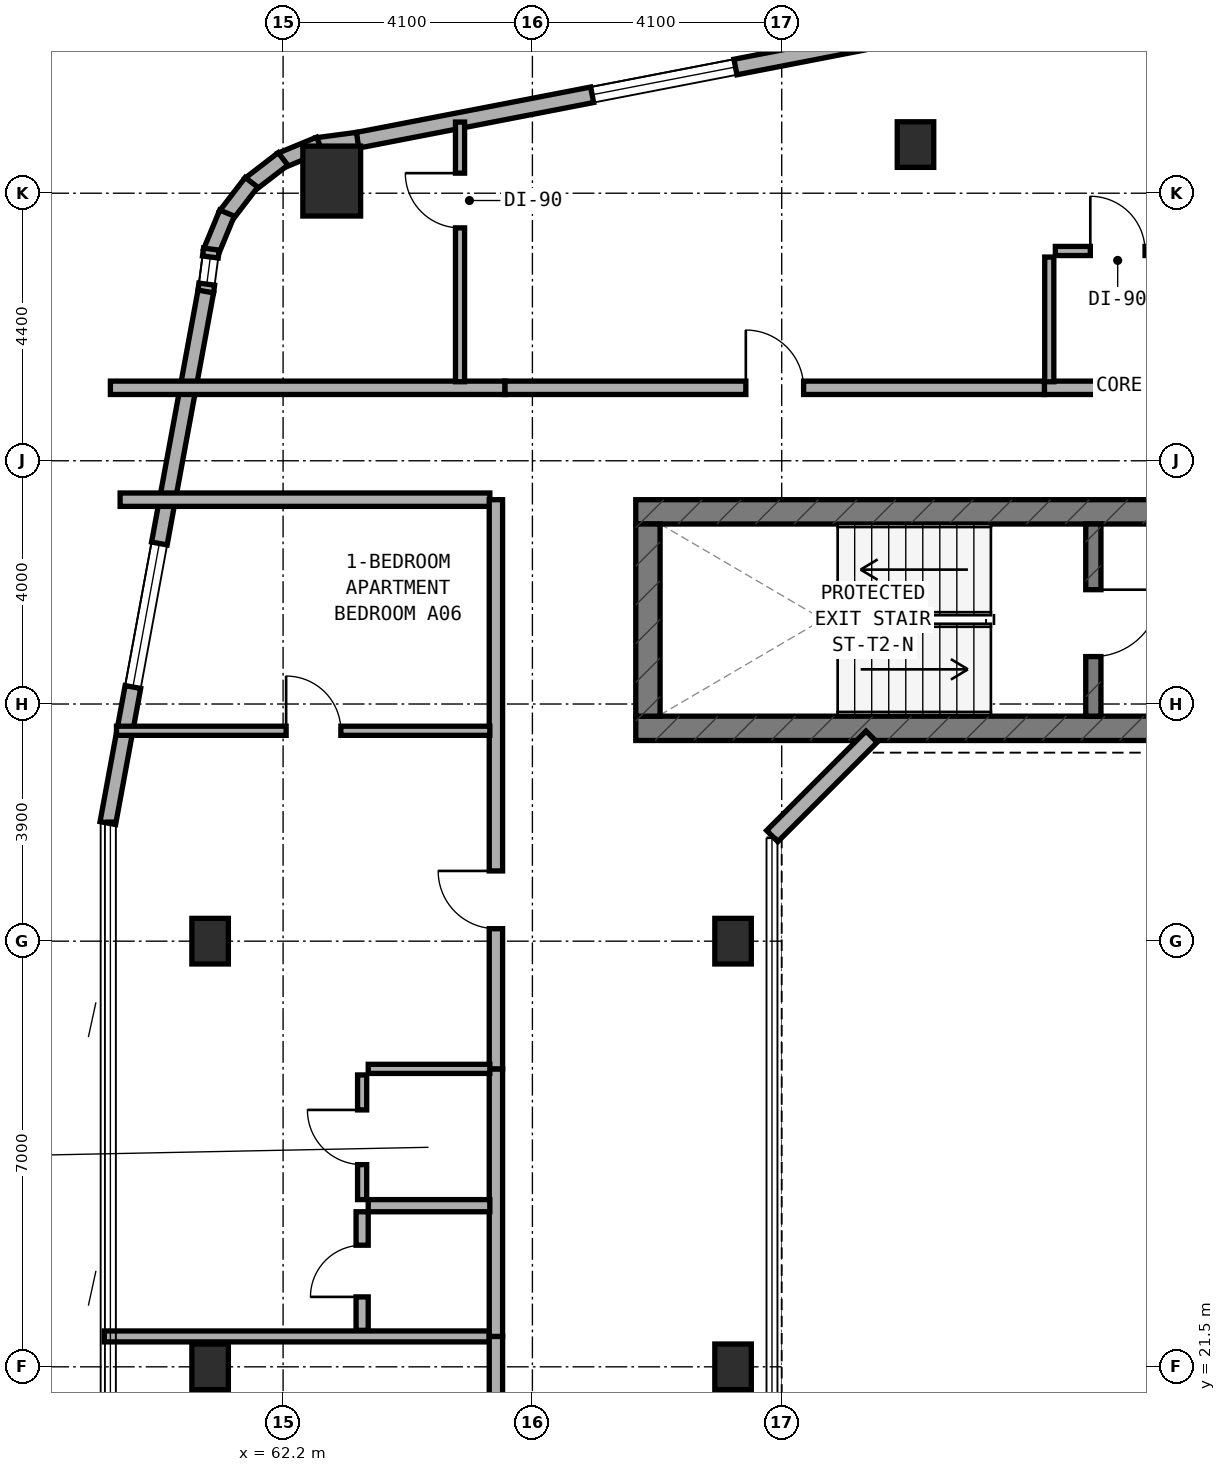
"""IFC4 building model, lengths in metres.
Left out: names, types, materials, properties, quantities, classifications, styles, units other than length and angle.
Written with IfcOpenShell. Run it as: python <this file> out.ifc"""

import sys

from ifc_helpers import new_model, si_unit, direction, frame, frame_2d, origin, origin_2d, place, context, subcontext, project, spatial, rectangle, extrude, element, fill, save


model = new_model("IFC4")
c1 = context("Model", 3, precision=1e-05, world=origin(), true_north=direction((0.0, 1.0)))
c2 = subcontext(c1, "Body", "Model", "MODEL_VIEW")
j1 = project(units=[si_unit("LENGTHUNIT", "METRE"), si_unit("PLANEANGLEUNIT", "RADIAN")], contexts=[c1])
p1 = place(None, origin())
s1 = spatial("IfcSite", under=j1, at=p1, CompositionType="ELEMENT")
p2 = place(p1, origin())
s2 = spatial("IfcBuilding", under=s1, at=p2, CompositionType="ELEMENT")
p3 = place(p2, frame((0.0, 0.0, 95.0)))
s3 = spatial("IfcBuildingStorey", under=s2, at=p3, CompositionType="ELEMENT", Elevation=95.0)
p4 = place(p3, frame((68.0, 32.0, 0.0), z_axis=(0.0, 0.0, 1.0), x_axis=(1.0, 0.0, 0.0)))
e1 = element("IfcWall", 1, at=p4, inside=s3, PredefinedType="SHEAR", context=c2, shape_type="SweptSolid", body=[
    extrude(rectangle(XDim=18.2, YDim=0.4, at=frame_2d((9.1, 0.0))), origin(), (0.0, 0.0, 1.0), 3.5),
])
p5 = place(p3, frame((68.0, 35.56, 0.0), z_axis=(0.0, 0.0, 1.0), x_axis=(1.0, 0.0, 0.0)))
e2 = element("IfcWall", 2, at=p5, inside=s3, PredefinedType="SHEAR", context=c2, shape_type="SweptSolid", body=[
    extrude(rectangle(XDim=18.2, YDim=0.4, at=frame_2d((9.1, 0.0))), origin(), (0.0, 0.0, 1.0), 3.5),
])
p6 = place(p5, frame((9.15, 0.0, 0.0)))
e3 = element("IfcOpeningElement", 3, at=p6, cuts=e2, PredefinedType="OPENING", context=c2, shape_type="SweptSolid", body=[
    extrude(rectangle(XDim=1.2, YDim=2.15, at=frame_2d((0.6, 1.075))), frame((0.0, 0.21, 0.0), z_axis=(0.0, -1.0, 0.0), x_axis=(1.0, 0.0, 0.0)), (0.0, 0.0, 1.0), 0.42),
])
p7 = place(p5, frame((16.75, 0.0, 0.0)))
e4 = element("IfcOpeningElement", 4, at=p7, cuts=e2, PredefinedType="OPENING", context=c2, shape_type="SweptSolid", body=[
    extrude(rectangle(XDim=0.85, YDim=2.1, at=frame_2d((0.425, 1.05))), frame((0.0, 0.21, 0.0), z_axis=(0.0, -1.0, 0.0), x_axis=(1.0, 0.0, 0.0)), (0.0, 0.0, 1.0), 0.42),
])
p8 = place(p3, frame((68.2, 32.2, 0.0), z_axis=(0.0, 0.0, 1.0), x_axis=(0.0, 1.0, 0.0)))
e5 = element("IfcWall", 5, at=p8, inside=s3, PredefinedType="SHEAR", context=c2, shape_type="SweptSolid", body=[
    extrude(rectangle(XDim=3.16, YDim=0.4, at=frame_2d((1.58, 0.0))), origin(), (0.0, 0.0, 1.0), 3.5),
])
p9 = place(p3, frame((75.525, 32.2, 0.0), z_axis=(0.0, 0.0, 1.0), x_axis=(0.0, 1.0, 0.0)))
e6 = element("IfcWall", 6, at=p9, inside=s3, PredefinedType="STANDARD", context=c2, shape_type="SweptSolid", body=[
    extrude(rectangle(XDim=3.16, YDim=0.25, at=frame_2d((1.58, 0.0))), origin(), (0.0, 0.0, 1.0), 3.25),
])
p10 = place(p9, frame((0.98, 0.0, 0.0)))
e7 = element("IfcOpeningElement", 7, at=p10, cuts=e6, PredefinedType="OPENING", context=c2, shape_type="SweptSolid", body=[
    extrude(rectangle(XDim=1.1, YDim=2.15, at=frame_2d((0.55, 1.075))), frame((0.0, 0.135, 0.0), z_axis=(0.0, -1.0, 0.0), x_axis=(1.0, 0.0, 0.0)), (0.0, 0.0, 1.0), 0.27),
])
for number, where, z_axis, x_axis in (
    (8, (72.6, 41.6, 0.0), (0.0, 0.0, 1.0), (1.0, 0.0, 0.0)),
    (9, (61.0, 21.5, 0.0), (0.0, 0.0, 1.0), (1.0, 0.0, 0.0)),
    (10, (61.0, 28.5, 0.0), (0.0, 0.0, 1.0), (1.0, 0.0, 0.0)),
):
    element("IfcColumn", number, at=place(p3, frame(where, z_axis=z_axis, x_axis=x_axis)), inside=s3, PredefinedType="COLUMN", context=c2, shape_type="SweptSolid", body=[
        extrude(rectangle(XDim=0.6, YDim=0.75, at=origin_2d()), origin(), (0.0, 0.0, 1.0), 3.5),
    ])
p11 = place(p3, frame((63.0, 41.0, 0.0), z_axis=(0.0, 0.0, 1.0), x_axis=(1.0, 0.0, 0.0)))
e11 = element("IfcColumn", 11, at=p11, inside=s3, PredefinedType="COLUMN", context=c2, shape_type="SweptSolid", body=[
    extrude(rectangle(XDim=0.95, YDim=1.15, at=origin_2d()), origin(), (0.0, 0.0, 1.0), 3.5),
])
for number, where, z_axis, x_axis in (
    (12, (69.6, 21.5, 0.0), (0.0, 0.0, 1.0), (1.0, 0.0, 0.0)),
    (13, (69.6, 28.5, 0.0), (0.0, 0.0, 1.0), (1.0, 0.0, 0.0)),
):
    element("IfcColumn", number, at=place(p3, frame(where, z_axis=z_axis, x_axis=x_axis)), inside=s3, PredefinedType="COLUMN", context=c2, shape_type="SweptSolid", body=[
        extrude(rectangle(XDim=0.6, YDim=0.75, at=origin_2d()), origin(), (0.0, 0.0, 1.0), 3.5),
    ])
p12 = place(p3, frame((71.739, 43.282, 0.0), z_axis=(0.0, 0.0, 1.0), x_axis=(-0.981750199588, -0.190175039396, 0.0)))
e14 = element("IfcWall", 14, at=p12, inside=s3, PredefinedType="STANDARD", context=c2, shape_type="SweptSolid", body=[
    extrude(rectangle(XDim=8.477, YDim=0.26, at=frame_2d((4.238, 0.0))), origin(), (0.0, 0.0, 1.0), 3.25),
])
p13 = place(p12, frame((2.139, 0.0, 0.8)))
e15 = element("IfcOpeningElement", 15, at=p13, cuts=e14, PredefinedType="OPENING", context=c2, shape_type="SweptSolid", body=[
    extrude(rectangle(XDim=2.4, YDim=1.6, at=frame_2d((1.2, 0.8))), frame((0.0, 0.14, 0.0), z_axis=(0.0, -1.0, 0.0), x_axis=(1.0, 0.0, 0.0)), (0.0, 0.0, 1.0), 0.28),
])
p14 = place(p3, frame((63.425, 41.672, 0.0), z_axis=(0.0, 0.0, 1.0), x_axis=(-0.991300187529, -0.13162043232, 0.0)))
e16 = element("IfcWall", 16, at=p14, inside=s3, PredefinedType="STANDARD", context=c2, shape_type="SweptSolid", body=[
    extrude(rectangle(XDim=0.677, YDim=0.26, at=frame_2d((0.338, 0.0))), origin(), (0.0, 0.0, 1.0), 3.25),
])
for number, where, z_axis, x_axis in (
    (17, (62.8, 41.601, 0.0), (0.0, 0.0, 1.0), (-0.924, -0.382, 0.0)),
    (18, (62.199, 41.364, 0.0), (0.0, 0.0, 1.0), (-0.793, -0.61, 0.0)),
    (19, (61.68, 40.979, 0.0), (0.0, 0.0, 1.0), (-0.609, -0.793, 0.0)),
):
    element("IfcWall", number, at=place(p3, frame(where, z_axis=z_axis, x_axis=x_axis)), inside=s3, PredefinedType="STANDARD", context=c2, shape_type="SweptSolid", body=[
        extrude(rectangle(XDim=0.694, YDim=0.26, at=frame_2d((0.347, 0.0))), origin(), (0.0, 0.0, 1.0), 3.25),
    ])
p15 = place(p3, frame((61.278, 40.473, 0.0), z_axis=(0.0, 0.0, 1.0), x_axis=(-0.382289608286, -0.924042561464, 0.0)))
e20 = element("IfcWall", 20, at=p15, inside=s3, PredefinedType="STANDARD", context=c2, shape_type="SweptSolid", body=[
    extrude(rectangle(XDim=0.694, YDim=0.26, at=frame_2d((0.347, 0.0))), origin(), (0.0, 0.0, 1.0), 3.25),
])
p16 = place(p3, frame((61.021, 39.881, 0.0), z_axis=(0.0, 0.0, 1.0), x_axis=(-0.130614135366, -0.991433279471, 0.0)))
e21 = element("IfcWall", 21, at=p16, inside=s3, PredefinedType="STANDARD", context=c2, shape_type="SweptSolid", body=[
    extrude(rectangle(XDim=0.712, YDim=0.26, at=frame_2d((0.356, 0.0))), origin(), (0.0, 0.0, 1.0), 3.25),
])
p17 = place(p16, frame((0.131, 0.0, 0.85)))
e22 = element("IfcOpeningElement", 22, at=p17, cuts=e21, PredefinedType="OPENING", context=c2, shape_type="SweptSolid", body=[
    extrude(rectangle(XDim=0.45, YDim=1.5, at=frame_2d((0.225, 0.75))), frame((0.0, 0.14, 0.0), z_axis=(0.0, -1.0, 0.0), x_axis=(1.0, 0.0, 0.0)), (0.0, 0.0, 1.0), 0.28),
])
p18 = place(p3, frame((60.929, 39.184, 0.0), z_axis=(0.0, 0.0, 1.0), x_axis=(-0.181209963057, -0.983444431215, 0.0)))
e23 = element("IfcWall", 23, at=p18, inside=s3, PredefinedType="STANDARD", context=c2, shape_type="SweptSolid", body=[
    extrude(rectangle(XDim=8.889, YDim=0.26, at=frame_2d((4.445, 0.0))), origin(), (0.0, 0.0, 1.0), 3.25),
])
p19 = place(p18, frame((4.214, 0.0, 0.8)))
e24 = element("IfcOpeningElement", 24, at=p19, cuts=e23, PredefinedType="OPENING", context=c2, shape_type="SweptSolid", body=[
    extrude(rectangle(XDim=2.4, YDim=1.6, at=frame_2d((1.2, 0.8))), frame((0.0, 0.14, 0.0), z_axis=(0.0, -1.0, 0.0), x_axis=(1.0, 0.0, 0.0)), (0.0, 0.0, 1.0), 0.28),
])
p20 = place(p3, frame((71.878, 31.862, 0.0), z_axis=(0.0, 0.0, 1.0), x_axis=(-0.707106781187, -0.707106781187, 0.0)))
e25 = element("IfcWall", 25, at=p20, inside=s3, PredefinedType="STANDARD", context=c2, shape_type="SweptSolid", body=[
    extrude(rectangle(XDim=2.311, YDim=0.26, at=frame_2d((1.155, 0.0))), origin(), (0.0, 0.0, 1.0), 3.25),
])
p21 = place(p3, frame((59.36, 37.6, 0.0), z_axis=(0.0, 0.0, 1.0), x_axis=(1.0, 0.0, 0.0)))
e26 = element("IfcWall", 26, at=p21, inside=s3, PredefinedType="SOLIDWALL", context=c2, shape_type="SweptSolid", body=[
    extrude(rectangle(XDim=6.49, YDim=0.22, at=frame_2d((3.245, 0.0))), origin(), (0.0, 0.0, 1.0), 2.945),
])
p22 = place(p3, frame((74.72, 37.6, 0.0), z_axis=(0.0, 0.0, 1.0), x_axis=(1.0, 0.0, 0.0)))
e27 = element("IfcWall", 27, at=p22, inside=s3, PredefinedType="SOLIDWALL", context=c2, shape_type="SweptSolid", body=[
    extrude(rectangle(XDim=6.68, YDim=0.22, at=frame_2d((3.34, 0.0))), origin(), (0.0, 0.0, 1.0), 2.825),
])
p23 = place(p3, frame((65.85, 37.6, 0.0), z_axis=(0.0, 0.0, 1.0), x_axis=(1.0, 0.0, 0.0)))
e28 = element("IfcWall", 28, at=p23, inside=s3, PredefinedType="SOLIDWALL", context=c2, shape_type="SweptSolid", body=[
    extrude(rectangle(XDim=8.87, YDim=0.22, at=frame_2d((4.435, 0.0))), origin(), (0.0, 0.0, 1.0), 2.825),
])
p24 = place(p23, frame((3.96, 0.0, 0.0)))
e29 = element("IfcOpeningElement", 29, at=p24, cuts=e28, PredefinedType="OPENING", context=c2, shape_type="SweptSolid", body=[
    extrude(rectangle(XDim=0.95, YDim=2.1, at=frame_2d((0.475, 1.05))), frame((0.0, 0.12, 0.0), z_axis=(0.0, -1.0, 0.0), x_axis=(1.0, 0.0, 0.0)), (0.0, 0.0, 1.0), 0.24),
])
p25 = place(p3, frame((65.11, 37.7, 0.0), z_axis=(0.0, 0.0, 1.0), x_axis=(0.0, 1.0, 0.0)))
e30 = element("IfcWall", 30, at=p25, inside=s3, PredefinedType="PARTITIONING", context=c2, shape_type="SweptSolid", body=[
    extrude(rectangle(XDim=4.27, YDim=0.15, at=frame_2d((2.135, 0.0))), origin(), (0.0, 0.0, 1.0), 2.945),
])
p26 = place(p25, frame((2.53, 0.0, 0.0)))
e31 = element("IfcOpeningElement", 31, at=p26, cuts=e30, PredefinedType="OPENING", context=c2, shape_type="SweptSolid", body=[
    extrude(rectangle(XDim=0.9, YDim=2.1, at=frame_2d((0.45, 1.05))), frame((0.0, 0.085, 0.0), z_axis=(0.0, -1.0, 0.0), x_axis=(1.0, 0.0, 0.0)), (0.0, 0.0, 1.0), 0.17),
])
p27 = place(p3, frame((74.8, 37.7, 0.0), z_axis=(0.0, 0.0, 1.0), x_axis=(0.0, 1.0, 0.0)))
e32 = element("IfcWall", 32, at=p27, inside=s3, PredefinedType="PARTITIONING", context=c2, shape_type="SweptSolid", body=[
    extrude(rectangle(XDim=2.05, YDim=0.15, at=frame_2d((1.025, 0.0))), origin(), (0.0, 0.0, 1.0), 2.955),
])
p28 = place(p3, frame((74.9, 39.85, 0.0), z_axis=(0.0, 0.0, 1.0), x_axis=(1.0, 0.0, 0.0)))
e33 = element("IfcWall", 33, at=p28, inside=s3, PredefinedType="PARTITIONING", context=c2, shape_type="SweptSolid", body=[
    extrude(rectangle(XDim=2.05, YDim=0.15, at=frame_2d((1.025, 0.0))), origin(), (0.0, 0.0, 1.0), 3.22),
])
p29 = place(p28, frame((0.575, 0.0, 0.0)))
e34 = element("IfcOpeningElement", 34, at=p29, cuts=e33, PredefinedType="OPENING", context=c2, shape_type="SweptSolid", body=[
    extrude(rectangle(XDim=0.9, YDim=2.1, at=frame_2d((0.45, 1.05))), frame((0.0, 0.085, 0.0), z_axis=(0.0, -1.0, 0.0), x_axis=(1.0, 0.0, 0.0)), (0.0, 0.0, 1.0), 0.17),
])
p30 = place(p3, frame((59.52, 35.76, 0.0), z_axis=(0.0, 0.0, 1.0), x_axis=(1.0, 0.0, 0.0)))
e35 = element("IfcWall", 35, at=p30, inside=s3, PredefinedType="SOLIDWALL", context=c2, shape_type="SweptSolid", body=[
    extrude(rectangle(XDim=6.08, YDim=0.22, at=frame_2d((3.04, 0.0))), origin(), (0.0, 0.0, 1.0), 2.945),
])
p31 = place(p3, frame((59.26, 22.0, 0.0), z_axis=(0.0, 0.0, 1.0), x_axis=(1.0, 0.0, 0.0)))
e36 = element("IfcWall", 36, at=p31, inside=s3, PredefinedType="SOLIDWALL", context=c2, shape_type="SweptSolid", body=[
    extrude(rectangle(XDim=6.44, YDim=0.18, at=frame_2d((3.22, 0.0))), origin(), (0.0, 0.0, 1.0), 2.945),
])
p32 = place(p3, frame((65.7, 18.64, 0.0), z_axis=(0.0, 0.0, 1.0), x_axis=(0.0, 1.0, 0.0)))
e37 = element("IfcWall", 37, at=p32, inside=s3, PredefinedType="SOLIDWALL", context=c2, shape_type="SweptSolid", body=[
    extrude(rectangle(XDim=3.36, YDim=0.22, at=frame_2d((1.68, 0.0))), origin(), (0.0, 0.0, 1.0), 2.825),
])
p33 = place(p32, frame((1.205, 0.0, 0.0)))
e38 = element("IfcOpeningElement", 38, at=p33, cuts=e37, PredefinedType="OPENING", context=c2, shape_type="SweptSolid", body=[
    extrude(rectangle(XDim=0.95, YDim=2.1, at=frame_2d((0.475, 1.05))), frame((0.0, 0.12, 0.0), z_axis=(0.0, -1.0, 0.0), x_axis=(1.0, 0.0, 0.0)), (0.0, 0.0, 1.0), 0.24),
])
p34 = place(p3, frame((65.7, 22.0, 0.0), z_axis=(0.0, 0.0, 1.0), x_axis=(0.0, 1.0, 0.0)))
e39 = element("IfcWall", 39, at=p34, inside=s3, PredefinedType="SOLIDWALL", context=c2, shape_type="SweptSolid", body=[
    extrude(rectangle(XDim=4.4, YDim=0.22, at=frame_2d((2.2, 0.0))), origin(), (0.0, 0.0, 1.0), 3.22),
])
p35 = place(p3, frame((65.7, 26.4, 0.0), z_axis=(0.0, 0.0, 1.0), x_axis=(0.0, 1.0, 0.0)))
e40 = element("IfcWall", 40, at=p35, inside=s3, PredefinedType="SOLIDWALL", context=c2, shape_type="SweptSolid", body=[
    extrude(rectangle(XDim=9.36, YDim=0.22, at=frame_2d((4.68, 0.0))), origin(), (0.0, 0.0, 1.0), 2.825),
])
p36 = place(p35, frame((2.305, 0.0, 0.0)))
e41 = element("IfcOpeningElement", 41, at=p36, cuts=e40, PredefinedType="OPENING", context=c2, shape_type="SweptSolid", body=[
    extrude(rectangle(XDim=0.95, YDim=2.1, at=frame_2d((0.475, 1.05))), frame((0.0, 0.12, 0.0), z_axis=(0.0, -1.0, 0.0), x_axis=(1.0, 0.0, 0.0)), (0.0, 0.0, 1.0), 0.24),
])
p37 = place(p3, frame((59.46, 31.96, 0.0), z_axis=(0.0, 0.0, 1.0), x_axis=(1.0, 0.0, 0.0)))
e42 = element("IfcWall", 42, at=p37, inside=s3, PredefinedType="PARTITIONING", context=c2, shape_type="SweptSolid", body=[
    extrude(rectangle(XDim=6.14, YDim=0.15, at=frame_2d((3.07, 0.0))), origin(), (0.0, 0.0, 1.0), 2.945),
])
p38 = place(p37, frame((2.79, 0.0, 0.0)))
e43 = element("IfcOpeningElement", 43, at=p38, cuts=e42, PredefinedType="OPENING", context=c2, shape_type="SweptSolid", body=[
    extrude(rectangle(XDim=0.9, YDim=2.1, at=frame_2d((0.45, 1.05))), frame((0.0, 0.085, 0.0), z_axis=(0.0, -1.0, 0.0), x_axis=(1.0, 0.0, 0.0)), (0.0, 0.0, 1.0), 0.17),
])
p39 = place(p3, frame((63.6, 24.15, 0.0), z_axis=(0.0, 0.0, 1.0), x_axis=(1.0, 0.0, 0.0)))
e44 = element("IfcWall", 44, at=p39, inside=s3, PredefinedType="PLUMBINGWALL", context=c2, shape_type="SweptSolid", body=[
    extrude(rectangle(XDim=2.0, YDim=0.2, at=frame_2d((1.0, 0.0))), origin(), (0.0, 0.0, 1.0), 3.22),
])
p40 = place(p3, frame((63.6, 26.4, 0.0), z_axis=(0.0, 0.0, 1.0), x_axis=(1.0, 0.0, 0.0)))
e45 = element("IfcWall", 45, at=p40, inside=s3, PredefinedType="PARTITIONING", context=c2, shape_type="SweptSolid", body=[
    extrude(rectangle(XDim=2.0, YDim=0.15, at=frame_2d((1.0, 0.0))), origin(), (0.0, 0.0, 1.0), 3.22),
])
p41 = place(p3, frame((63.5, 22.1, 0.0), z_axis=(0.0, 0.0, 1.0), x_axis=(0.0, 1.0, 0.0)))
e46 = element("IfcWall", 46, at=p41, inside=s3, PredefinedType="PLUMBINGWALL", context=c2, shape_type="SweptSolid", body=[
    extrude(rectangle(XDim=1.95, YDim=0.2, at=frame_2d((0.975, 0.0))), origin(), (0.0, 0.0, 1.0), 3.22),
])
p42 = place(p41, frame((0.55, 0.0, 0.0)))
e47 = element("IfcOpeningElement", 47, at=p42, cuts=e46, PredefinedType="OPENING", context=c2, shape_type="SweptSolid", body=[
    extrude(rectangle(XDim=0.85, YDim=2.1, at=frame_2d((0.425, 1.05))), frame((0.0, 0.11, 0.0), z_axis=(0.0, -1.0, 0.0), x_axis=(1.0, 0.0, 0.0)), (0.0, 0.0, 1.0), 0.22),
])
p43 = place(p3, frame((63.5, 24.25, 0.0), z_axis=(0.0, 0.0, 1.0), x_axis=(0.0, 1.0, 0.0)))
e48 = element("IfcWall", 48, at=p43, inside=s3, PredefinedType="PARTITIONING", context=c2, shape_type="SweptSolid", body=[
    extrude(rectangle(XDim=2.05, YDim=0.15, at=frame_2d((1.025, 0.0))), origin(), (0.0, 0.0, 1.0), 3.22),
])
p44 = place(p43, frame((0.575, 0.0, 0.0)))
e49 = element("IfcOpeningElement", 49, at=p44, cuts=e48, PredefinedType="OPENING", context=c2, shape_type="SweptSolid", body=[
    extrude(rectangle(XDim=0.9, YDim=2.1, at=frame_2d((0.45, 1.05))), frame((0.0, 0.085, 0.0), z_axis=(0.0, -1.0, 0.0), x_axis=(1.0, 0.0, 0.0)), (0.0, 0.0, 1.0), 0.17),
])
p45 = place(p13, origin())
e50 = element("IfcWindow", 50, at=p45, inside=s3, PartitioningType="SINGLE_PANEL", PredefinedType="WINDOW", context=c2, shape_type="SweptSolid", body=[
    extrude(rectangle(XDim=2.4, YDim=1.6, at=frame_2d((1.2, 0.8))), frame((0.0, 0.03, 0.0), z_axis=(0.0, -1.0, 0.0), x_axis=(1.0, 0.0, 0.0)), (0.0, 0.0, 1.0), 0.06),
])
fill(e15, e50)
p46 = place(p19, origin())
e51 = element("IfcWindow", 51, at=p46, inside=s3, PartitioningType="SINGLE_PANEL", PredefinedType="WINDOW", context=c2, shape_type="SweptSolid", body=[
    extrude(rectangle(XDim=2.4, YDim=1.6, at=frame_2d((1.2, 0.8))), frame((0.0, 0.03, 0.0), z_axis=(0.0, -1.0, 0.0), x_axis=(1.0, 0.0, 0.0)), (0.0, 0.0, 1.0), 0.06),
])
fill(e24, e51)
p47 = place(p17, origin())
e52 = element("IfcWindow", 52, at=p47, inside=s3, PartitioningType="SINGLE_PANEL", PredefinedType="WINDOW", context=c2, shape_type="SweptSolid", body=[
    extrude(rectangle(XDim=0.45, YDim=1.5, at=frame_2d((0.225, 0.75))), frame((0.0, 0.03, 0.0), z_axis=(0.0, -1.0, 0.0), x_axis=(1.0, 0.0, 0.0)), (0.0, 0.0, 1.0), 0.06),
])
fill(e22, e52)
p48 = place(p10, frame((1.1, 0.0, 0.0), z_axis=(0.0, 0.0, 1.0), x_axis=(-1.0, 0.0, 0.0)))
e53 = element("IfcDoor", 53, at=p48, inside=s3, OperationType="SINGLE_SWING_LEFT", PredefinedType="DOOR", context=c2, shape_type="SweptSolid", body=[
    extrude(rectangle(XDim=1.1, YDim=2.15, at=frame_2d((0.55, 1.075))), frame((0.0, 0.025, 0.0), z_axis=(0.0, -1.0, 0.0), x_axis=(1.0, 0.0, 0.0)), (0.0, 0.0, 1.0), 0.05),
])
fill(e7, e53)
p49 = place(p24, origin())
e54 = element("IfcDoor", 54, at=p49, inside=s3, OperationType="SINGLE_SWING_LEFT", PredefinedType="DOOR", context=c2, shape_type="SweptSolid", body=[
    extrude(rectangle(XDim=0.95, YDim=2.1, at=frame_2d((0.475, 1.05))), frame((0.0, 0.025, 0.0), z_axis=(0.0, -1.0, 0.0), x_axis=(1.0, 0.0, 0.0)), (0.0, 0.0, 1.0), 0.05),
])
fill(e29, e54)
p50 = place(p26, origin())
e55 = element("IfcDoor", 55, at=p50, inside=s3, OperationType="SINGLE_SWING_RIGHT", PredefinedType="DOOR", context=c2, shape_type="SweptSolid", body=[
    extrude(rectangle(XDim=0.9, YDim=2.1, at=frame_2d((0.45, 1.05))), frame((0.0, 0.025, 0.0), z_axis=(0.0, -1.0, 0.0), x_axis=(1.0, 0.0, 0.0)), (0.0, 0.0, 1.0), 0.05),
])
fill(e31, e55)
p51 = place(p29, origin())
e56 = element("IfcDoor", 56, at=p51, inside=s3, OperationType="SINGLE_SWING_LEFT", PredefinedType="DOOR", context=c2, shape_type="SweptSolid", body=[
    extrude(rectangle(XDim=0.9, YDim=2.1, at=frame_2d((0.45, 1.05))), frame((0.0, 0.025, 0.0), z_axis=(0.0, -1.0, 0.0), x_axis=(1.0, 0.0, 0.0)), (0.0, 0.0, 1.0), 0.05),
])
fill(e34, e56)
p52 = place(p36, origin())
e57 = element("IfcDoor", 57, at=p52, inside=s3, OperationType="SINGLE_SWING_RIGHT", PredefinedType="DOOR", context=c2, shape_type="SweptSolid", body=[
    extrude(rectangle(XDim=0.95, YDim=2.1, at=frame_2d((0.475, 1.05))), frame((0.0, 0.025, 0.0), z_axis=(0.0, -1.0, 0.0), x_axis=(1.0, 0.0, 0.0)), (0.0, 0.0, 1.0), 0.05),
])
fill(e41, e57)
p53 = place(p38, origin())
e58 = element("IfcDoor", 58, at=p53, inside=s3, OperationType="SINGLE_SWING_LEFT", PredefinedType="DOOR", context=c2, shape_type="SweptSolid", body=[
    extrude(rectangle(XDim=0.9, YDim=2.1, at=frame_2d((0.45, 1.05))), frame((0.0, 0.025, 0.0), z_axis=(0.0, -1.0, 0.0), x_axis=(1.0, 0.0, 0.0)), (0.0, 0.0, 1.0), 0.05),
])
fill(e43, e58)
p54 = place(p42, origin())
e59 = element("IfcDoor", 59, at=p54, inside=s3, OperationType="SINGLE_SWING_LEFT", PredefinedType="DOOR", context=c2, shape_type="SweptSolid", body=[
    extrude(rectangle(XDim=0.85, YDim=2.1, at=frame_2d((0.425, 1.05))), frame((0.0, 0.025, 0.0), z_axis=(0.0, -1.0, 0.0), x_axis=(1.0, 0.0, 0.0)), (0.0, 0.0, 1.0), 0.05),
])
fill(e47, e59)
p55 = place(p44, origin())
e60 = element("IfcDoor", 60, at=p55, inside=s3, OperationType="SINGLE_SWING_RIGHT", PredefinedType="DOOR", context=c2, shape_type="SweptSolid", body=[
    extrude(rectangle(XDim=0.9, YDim=2.1, at=frame_2d((0.45, 1.05))), frame((0.0, 0.025, 0.0), z_axis=(0.0, -1.0, 0.0), x_axis=(1.0, 0.0, 0.0)), (0.0, 0.0, 1.0), 0.05),
])
fill(e49, e60)
save(model, sys.argv[1])
